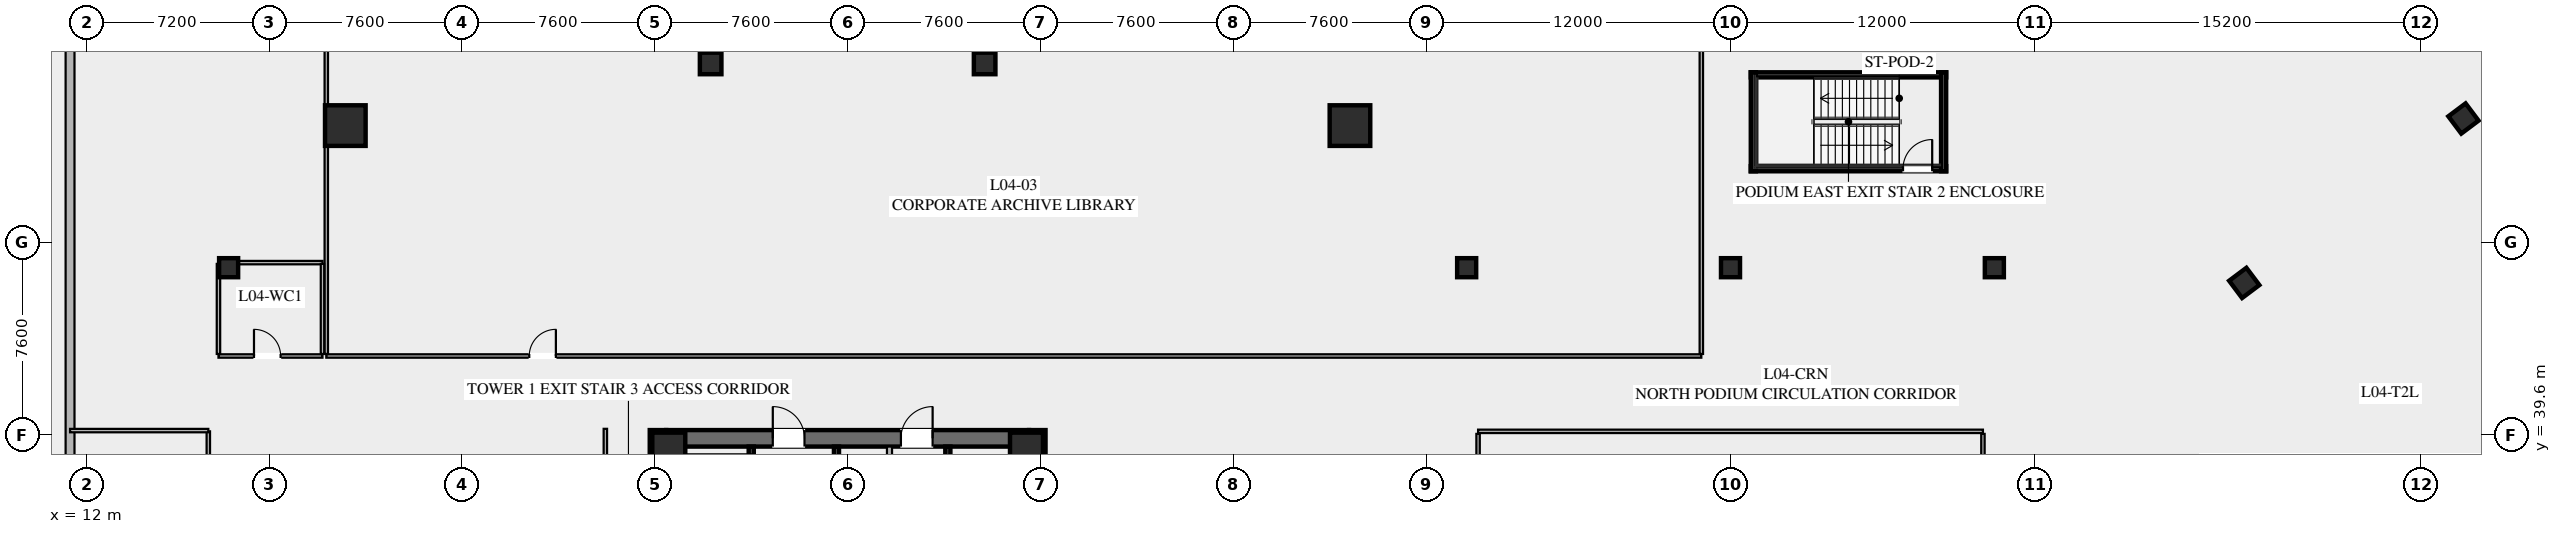
"""IFC4 building model, lengths in metres.
Left out: names, types, materials, properties, quantities, classifications, styles, units other than length and angle.
Written with IfcOpenShell. Run it as: python <this file> out.ifc"""

import sys

from ifc_helpers import new_model, si_unit, direction, frame, frame_2d, origin, origin_2d, place, context, subcontext, project, spatial, rectangle, hollow_rectangle, extrude, element, fill, save


model = new_model("IFC4")
c1 = context("Model", 3, precision=1e-05, world=origin(), true_north=direction((0.0, 1.0)))
c2 = subcontext(c1, "Body", "Model", "MODEL_VIEW")
j1 = project(units=[si_unit("LENGTHUNIT", "METRE"), si_unit("PLANEANGLEUNIT", "RADIAN")], contexts=[c1])
p1 = place(None, origin())
s1 = spatial("IfcSite", under=j1, at=p1, CompositionType="ELEMENT")
p2 = place(p1, origin())
s2 = spatial("IfcBuilding", under=s1, at=p2, CompositionType="ELEMENT")
p3 = place(p2, frame((0.0, 0.0, 19.8)))
s3 = spatial("IfcBuildingStorey", under=s2, at=p3, CompositionType="ELEMENT", Elevation=19.8)
for number, where, z_axis, x_axis in (
    (1, (34.525, 24.2, 0.0), (0.0, 0.0, 1.0), (0.0, 1.0, 0.0)),
    (2, (49.475, 39.8, 0.0), (0.0, 0.0, 1.0), (0.0, -1.0, 0.0)),
):
    element("IfcWall", number, at=place(p3, frame(where, z_axis=z_axis, x_axis=x_axis)), inside=s3, PredefinedType="SHEAR", context=c2, shape_type="SweptSolid", body=[
        extrude(rectangle(XDim=15.6, YDim=0.65, at=frame_2d((7.8, 0.0))), origin(), (0.0, 0.0, 1.0), 4.8),
    ])
p4 = place(p3, frame((34.85, 39.475, 0.0), z_axis=(0.0, 0.0, 1.0), x_axis=(1.0, 0.0, 0.0)))
e3 = element("IfcWall", 3, at=p4, inside=s3, PredefinedType="SHEAR", context=c2, shape_type="SweptSolid", body=[
    extrude(rectangle(XDim=14.3, YDim=0.65, at=frame_2d((7.15, 0.0))), origin(), (0.0, 0.0, 1.0), 4.8),
])
p5 = place(p4, frame((4.2, 0.0, 0.0)))
e4 = element("IfcOpeningElement", 4, at=p5, cuts=e3, PredefinedType="OPENING", context=c2, shape_type="SweptSolid", body=[
    extrude(rectangle(XDim=1.25, YDim=2.25, at=frame_2d((0.625, 1.125))), frame((0.0, 0.335, 0.0), z_axis=(0.0, -1.0, 0.0), x_axis=(1.0, 0.0, 0.0)), (0.0, 0.0, 1.0), 0.67),
])
p6 = place(p4, frame((9.25, 0.0, 0.0)))
e5 = element("IfcOpeningElement", 5, at=p6, cuts=e3, PredefinedType="OPENING", context=c2, shape_type="SweptSolid", body=[
    extrude(rectangle(XDim=1.25, YDim=2.25, at=frame_2d((0.625, 1.125))), frame((0.0, 0.335, 0.0), z_axis=(0.0, -1.0, 0.0), x_axis=(1.0, 0.0, 0.0)), (0.0, 0.0, 1.0), 0.67),
])
for number, where, z_axis, x_axis in (
    (6, (49.05, 39.05, 0.0), (0.0, 0.0, 1.0), (1.0, 0.0, 0.0)),
    (7, (34.95, 39.05, 0.0), (0.0, 0.0, 1.0), (1.0, 0.0, 0.0)),
):
    element("IfcColumn", number, at=place(p3, frame(where, z_axis=z_axis, x_axis=x_axis)), inside=s3, PredefinedType="COLUMN", context=c2, shape_type="SweptSolid", body=[
        extrude(hollow_rectangle(XDim=1.3, YDim=1.3, WallThickness=0.05, at=origin_2d()), origin(), (0.0, 0.0, 1.0), 4.6),
    ])
for number, where, z_axis, x_axis in (
    (8, (61.8, 51.8, 0.0), (0.0, 0.0, 1.0), (1.0, 0.0, 0.0)),
    (9, (22.2, 51.8, 0.0), (0.0, 0.0, 1.0), (1.0, 0.0, 0.0)),
):
    element("IfcColumn", number, at=place(p3, frame(where, z_axis=z_axis, x_axis=x_axis)), inside=s3, PredefinedType="COLUMN", context=c2, shape_type="SweptSolid", body=[
        extrude(hollow_rectangle(XDim=1.6, YDim=1.6, WallThickness=0.06, at=origin_2d()), origin(), (0.0, 0.0, 1.0), 4.6),
    ])
for number, where, z_axis, x_axis in (
    (10, (47.4, 54.25, 0.0), (0.0, 0.0, 1.0), (1.0, 0.0, 0.0)),
    (11, (36.6, 54.25, 0.0), (0.0, 0.0, 1.0), (1.0, 0.0, 0.0)),
):
    element("IfcColumn", number, at=place(p3, frame(where, z_axis=z_axis, x_axis=x_axis)), inside=s3, PredefinedType="COLUMN", context=c2, shape_type="SweptSolid", body=[
        extrude(hollow_rectangle(XDim=0.85, YDim=0.85, WallThickness=0.035, at=origin_2d()), origin(), (0.0, 0.0, 1.0), 4.6),
    ])
p7 = place(p3, frame((103.571, 33.522, 0.0), z_axis=(0.0, 0.0, 1.0), x_axis=(0.799998028465, 0.600002628705, 0.0)))
e12 = element("IfcWall", 12, at=p7, inside=s3, PredefinedType="SHEAR", context=c2, shape_type="SweptSolid", body=[
    extrude(rectangle(XDim=14.86, YDim=0.65, at=frame_2d((7.43, 0.0))), origin(), (0.0, 0.0, 1.0), 4.8),
])
p8 = place(p7, frame((4.48, 0.0, 0.0)))
e13 = element("IfcOpeningElement", 13, at=p8, cuts=e12, PredefinedType="OPENING", context=c2, shape_type="SweptSolid", body=[
    extrude(rectangle(XDim=1.25, YDim=2.25, at=frame_2d((0.625, 1.125))), frame((0.0, 0.335, 0.0), z_axis=(0.0, -1.0, 0.0), x_axis=(1.0, 0.0, 0.0)), (0.0, 0.0, 1.0), 0.67),
])
p9 = place(p7, frame((9.53, 0.0, 0.0)))
e14 = element("IfcOpeningElement", 14, at=p9, cuts=e12, PredefinedType="OPENING", context=c2, shape_type="SweptSolid", body=[
    extrude(rectangle(XDim=1.25, YDim=2.25, at=frame_2d((0.625, 1.125))), frame((0.0, 0.335, 0.0), z_axis=(0.0, -1.0, 0.0), x_axis=(1.0, 0.0, 0.0)), (0.0, 0.0, 1.0), 0.67),
])
for number, where, z_axis, x_axis in (
    (15, (105.69, 52.08, 0.0), (0.0, 0.0, 1.0), (0.8, 0.6, 0.0)),
    (16, (97.05, 45.6, 0.0), (0.0, 0.0, 1.0), (0.8, 0.6, 0.0)),
):
    element("IfcColumn", number, at=place(p3, frame(where, z_axis=z_axis, x_axis=x_axis)), inside=s3, PredefinedType="COLUMN", context=c2, shape_type="SweptSolid", body=[
        extrude(hollow_rectangle(XDim=0.85, YDim=0.85, WallThickness=0.035, at=origin_2d()), origin(), (0.0, 0.0, 1.0), 4.6),
    ])
for number, where, z_axis, x_axis in (
    (17, (17.6, 46.2, 0.0), (0.0, 0.0, 1.0), (1.0, 0.0, 0.0)),
    (18, (66.4, 46.2, 0.0), (0.0, 0.0, 1.0), (1.0, 0.0, 0.0)),
    (19, (76.8, 46.2, 0.0), (0.0, 0.0, 1.0), (1.0, 0.0, 0.0)),
    (20, (87.2, 46.2, 0.0), (0.0, 0.0, 1.0), (1.0, 0.0, 0.0)),
):
    element("IfcColumn", number, at=place(p3, frame(where, z_axis=z_axis, x_axis=x_axis)), inside=s3, PredefinedType="COLUMN", context=c2, shape_type="SweptSolid", body=[
        extrude(rectangle(XDim=0.75, YDim=0.75, at=origin_2d()), origin(), (0.0, 0.0, 1.0), 4.6),
    ])
p10 = place(p3, frame((11.35, 15.8, 0.0), z_axis=(0.0, 0.0, 1.0), x_axis=(0.0, 1.0, 0.0)))
e21 = element("IfcWall", 21, at=p10, inside=s3, PredefinedType="SOLIDWALL", context=c2, shape_type="SweptSolid", body=[
    extrude(rectangle(XDim=39.625, YDim=0.35, at=frame_2d((19.812, 0.0))), origin(), (0.0, 0.0, 1.0), 4.6),
])
p11 = place(p10, frame((15.7, 0.0, 0.0)))
e22 = element("IfcOpeningElement", 22, at=p11, cuts=e21, PredefinedType="OPENING", context=c2, shape_type="SweptSolid", body=[
    extrude(rectangle(XDim=1.65, YDim=2.2, at=frame_2d((0.825, 1.1))), frame((0.0, 0.185, 0.0), z_axis=(0.0, -1.0, 0.0), x_axis=(1.0, 0.0, 0.0)), (0.0, 0.0, 1.0), 0.37),
])
p12 = place(p3, frame((38.2, 31.2, 0.0), z_axis=(0.0, 0.0, 1.0), x_axis=(0.0, 1.0, 0.0)))
e23 = element("IfcWall", 23, at=p12, inside=s3, PredefinedType="SHEAR", context=c2, shape_type="SweptSolid", body=[
    extrude(rectangle(XDim=7.95, YDim=0.2, at=frame_2d((3.975, 0.0))), origin(), (0.0, 0.0, 1.0), 4.6),
])
p13 = place(p12, frame((0.45, 0.0, 0.0)))
e24 = element("IfcOpeningElement", 24, at=p13, cuts=e23, PredefinedType="OPENING", context=c2, shape_type="SweptSolid", body=[
    extrude(rectangle(XDim=1.15, YDim=2.2, at=frame_2d((0.575, 1.1))), frame((0.0, 0.11, 0.0), z_axis=(0.0, -1.0, 0.0), x_axis=(1.0, 0.0, 0.0)), (0.0, 0.0, 1.0), 0.22),
])
p14 = place(p3, frame((41.56, 24.85, 0.0), z_axis=(0.0, 0.0, 1.0), x_axis=(0.0, 1.0, 0.0)))
e25 = element("IfcWall", 25, at=p14, inside=s3, PredefinedType="SHEAR", context=c2, shape_type="SweptSolid", body=[
    extrude(rectangle(XDim=14.3, YDim=0.2, at=frame_2d((7.15, 0.0))), origin(), (0.0, 0.0, 1.0), 4.6),
])
p15 = place(p3, frame((45.95, 39.15, 0.0), z_axis=(0.0, 0.0, 1.0), x_axis=(0.0, -1.0, 0.0)))
e26 = element("IfcWall", 26, at=p15, inside=s3, PredefinedType="SHEAR", context=c2, shape_type="SweptSolid", body=[
    extrude(rectangle(XDim=6.35, YDim=0.2, at=frame_2d((3.175, 0.0))), origin(), (0.0, 0.0, 1.0), 4.6),
])
p16 = place(p3, frame((43.65, 32.35, 0.0), z_axis=(0.0, 0.0, 1.0), x_axis=(0.0, 1.0, 0.0)))
e27 = element("IfcWall", 27, at=p16, inside=s3, PredefinedType="SOLIDWALL", context=c2, shape_type="SweptSolid", body=[
    extrude(rectangle(XDim=6.8, YDim=0.2, at=frame_2d((3.4, 0.0))), origin(), (0.0, 0.0, 1.0), 4.6),
])
p17 = place(p3, frame((32.45, 35.4, 0.0), z_axis=(0.0, 0.0, 1.0), x_axis=(0.0, 1.0, 0.0)))
e28 = element("IfcWall", 28, at=p17, inside=s3, PredefinedType="PARTITIONING", context=c2, shape_type="SweptSolid", body=[
    extrude(rectangle(XDim=4.45, YDim=0.135, at=frame_2d((2.225, 0.0))), origin(), (0.0, 0.0, 1.0), 3.643),
])
p18 = place(p3, frame((77.6, 50.1, 0.0), z_axis=(0.0, 0.0, 1.0), x_axis=(1.0, 0.0, 0.0)))
e29 = element("IfcWall", 29, at=p18, inside=s3, PredefinedType="SHEAR", context=c2, shape_type="SweptSolid", body=[
    extrude(rectangle(XDim=7.7, YDim=0.2, at=frame_2d((3.85, 0.0))), origin(), (0.0, 0.0, 1.0), 4.6),
])
p19 = place(p18, frame((6.0, 0.0, 0.0)))
e30 = element("IfcOpeningElement", 30, at=p19, cuts=e29, PredefinedType="OPENING", context=c2, shape_type="SweptSolid", body=[
    extrude(rectangle(XDim=1.15, YDim=2.2, at=frame_2d((0.575, 1.1))), frame((0.0, 0.11, 0.0), z_axis=(0.0, -1.0, 0.0), x_axis=(1.0, 0.0, 0.0)), (0.0, 0.0, 1.0), 0.22),
])
p20 = place(p3, frame((77.6, 53.8, 0.0), z_axis=(0.0, 0.0, 1.0), x_axis=(1.0, 0.0, 0.0)))
e31 = element("IfcWall", 31, at=p20, inside=s3, PredefinedType="SHEAR", context=c2, shape_type="SweptSolid", body=[
    extrude(rectangle(XDim=7.7, YDim=0.2, at=frame_2d((3.85, 0.0))), origin(), (0.0, 0.0, 1.0), 4.6),
])
for number, where, z_axis, x_axis in (
    (32, (77.7, 50.0, 0.0), (0.0, 0.0, 1.0), (0.0, 1.0, 0.0)),
    (33, (85.2, 50.0, 0.0), (0.0, 0.0, 1.0), (0.0, 1.0, 0.0)),
):
    element("IfcWall", number, at=place(p3, frame(where, z_axis=z_axis, x_axis=x_axis)), inside=s3, PredefinedType="SHEAR", context=c2, shape_type="SweptSolid", body=[
        extrude(rectangle(XDim=3.9, YDim=0.2, at=frame_2d((1.95, 0.0))), origin(), (0.0, 0.0, 1.0), 4.6),
    ])
p21 = place(p3, frame((16.8, 24.35, 0.0), z_axis=(0.0, 0.0, 1.0), x_axis=(0.0, 1.0, 0.0)))
e34 = element("IfcWall", 34, at=p21, inside=s3, PredefinedType="PARTITIONING", context=c2, shape_type="SweptSolid", body=[
    extrude(rectangle(XDim=15.4, YDim=0.135, at=frame_2d((7.7, 0.0))), origin(), (0.0, 0.0, 1.0), 3.643),
])
p22 = place(p3, frame((11.35, 39.78, 0.0), z_axis=(0.0, 0.0, 1.0), x_axis=(1.0, 0.0, 0.0)))
e35 = element("IfcWall", 35, at=p22, inside=s3, PredefinedType="PARTITIONING", context=c2, shape_type="SweptSolid", body=[
    extrude(rectangle(XDim=5.45, YDim=0.135, at=frame_2d((2.725, 0.0))), origin(), (0.0, 0.0, 1.0), 3.643),
])
for number, where, z_axis, x_axis in (
    (36, (66.85, 24.35, 0.0), (0.0, 0.0, 1.0), (0.0, 1.0, 0.0)),
    (37, (86.75, 24.35, 0.0), (0.0, 0.0, 1.0), (0.0, 1.0, 0.0)),
):
    element("IfcWall", number, at=place(p3, frame(where, z_axis=z_axis, x_axis=x_axis)), inside=s3, PredefinedType="PARTITIONING", context=c2, shape_type="SweptSolid", body=[
        extrude(rectangle(XDim=15.3, YDim=0.135, at=frame_2d((7.65, 0.0))), origin(), (0.0, 0.0, 1.0), 3.643),
    ])
p23 = place(p3, frame((66.85, 39.75, 0.0), z_axis=(0.0, 0.0, 1.0), x_axis=(1.0, 0.0, 0.0)))
e38 = element("IfcWall", 38, at=p23, inside=s3, PredefinedType="PARTITIONING", context=c2, shape_type="SweptSolid", body=[
    extrude(rectangle(XDim=19.9, YDim=0.135, at=frame_2d((9.95, 0.0))), origin(), (0.0, 0.0, 1.0), 3.643),
])
p24 = place(p3, frame((21.45, 42.72, 0.0), z_axis=(0.0, 0.0, 1.0), x_axis=(1.0, 0.0, 0.0)))
e39 = element("IfcWall", 39, at=p24, inside=s3, PredefinedType="PARTITIONING", context=c2, shape_type="SweptSolid", body=[
    extrude(rectangle(XDim=54.2, YDim=0.135, at=frame_2d((27.1, 0.0))), origin(), (0.0, 0.0, 1.0), 3.643),
])
p25 = place(p24, frame((8.0, 0.0, 0.0)))
e40 = element("IfcOpeningElement", 40, at=p25, cuts=e39, PredefinedType="OPENING", context=c2, shape_type="SweptSolid", body=[
    extrude(rectangle(XDim=1.05, YDim=2.2, at=frame_2d((0.525, 1.1))), frame((0.0, 0.077, 0.0), z_axis=(0.0, -1.0, 0.0), x_axis=(1.0, 0.0, 0.0)), (0.0, 0.0, 1.0), 0.155),
])
for number, where, z_axis, x_axis in (
    (41, (21.45, 42.8, 0.0), (0.0, 0.0, 1.0), (0.0, 1.0, 0.0)),
    (42, (75.65, 42.8, 0.0), (0.0, 0.0, 1.0), (0.0, 1.0, 0.0)),
):
    element("IfcWall", number, at=place(p3, frame(where, z_axis=z_axis, x_axis=x_axis)), inside=s3, PredefinedType="PARTITIONING", context=c2, shape_type="SweptSolid", body=[
        extrude(rectangle(XDim=12.62, YDim=0.135, at=frame_2d((6.31, 0.0))), origin(), (0.0, 0.0, 1.0), 3.643),
    ])
p26 = place(p3, frame((17.2, 42.72, 0.0), z_axis=(0.0, 0.0, 1.0), x_axis=(1.0, 0.0, 0.0)))
e43 = element("IfcWall", 43, at=p26, inside=s3, PredefinedType="PARTITIONING", context=c2, shape_type="SweptSolid", body=[
    extrude(rectangle(XDim=4.1, YDim=0.135, at=frame_2d((2.05, 0.0))), origin(), (0.0, 0.0, 1.0), 3.643),
])
p27 = place(p26, frame((1.4, 0.0, 0.0)))
e44 = element("IfcOpeningElement", 44, at=p27, cuts=e43, PredefinedType="OPENING", context=c2, shape_type="SweptSolid", body=[
    extrude(rectangle(XDim=1.05, YDim=2.2, at=frame_2d((0.525, 1.1))), frame((0.0, 0.077, 0.0), z_axis=(0.0, -1.0, 0.0), x_axis=(1.0, 0.0, 0.0)), (0.0, 0.0, 1.0), 0.155),
])
p28 = place(p3, frame((17.2, 46.4, 0.0), z_axis=(0.0, 0.0, 1.0), x_axis=(1.0, 0.0, 0.0)))
e45 = element("IfcWall", 45, at=p28, inside=s3, PredefinedType="PARTITIONING", context=c2, shape_type="SweptSolid", body=[
    extrude(rectangle(XDim=4.1, YDim=0.135, at=frame_2d((2.05, 0.0))), origin(), (0.0, 0.0, 1.0), 3.643),
])
for number, where, z_axis, x_axis in (
    (46, (17.2, 42.8, 0.0), (0.0, 0.0, 1.0), (0.0, 1.0, 0.0)),
    (47, (21.3, 42.8, 0.0), (0.0, 0.0, 1.0), (0.0, 1.0, 0.0)),
):
    element("IfcWall", number, at=place(p3, frame(where, z_axis=z_axis, x_axis=x_axis)), inside=s3, PredefinedType="PARTITIONING", context=c2, shape_type="SweptSolid", body=[
        extrude(rectangle(XDim=3.55, YDim=0.135, at=frame_2d((1.775, 0.0))), origin(), (0.0, 0.0, 1.0), 3.643),
    ])
p29 = place(p5, origin())
e48 = element("IfcDoor", 48, at=p29, inside=s3, OperationType="SINGLE_SWING_LEFT", PredefinedType="DOOR", context=c2, shape_type="SweptSolid", body=[
    extrude(rectangle(XDim=1.25, YDim=2.25, at=frame_2d((0.625, 1.125))), frame((0.0, 0.025, 0.0), z_axis=(0.0, -1.0, 0.0), x_axis=(1.0, 0.0, 0.0)), (0.0, 0.0, 1.0), 0.05),
])
fill(e4, e48)
p30 = place(p6, origin())
e49 = element("IfcDoor", 49, at=p30, inside=s3, OperationType="SINGLE_SWING_RIGHT", PredefinedType="DOOR", context=c2, shape_type="SweptSolid", body=[
    extrude(rectangle(XDim=1.25, YDim=2.25, at=frame_2d((0.625, 1.125))), frame((0.0, 0.025, 0.0), z_axis=(0.0, -1.0, 0.0), x_axis=(1.0, 0.0, 0.0)), (0.0, 0.0, 1.0), 0.05),
])
fill(e5, e49)
p31 = place(p19, origin())
e50 = element("IfcDoor", 50, at=p31, inside=s3, OperationType="SINGLE_SWING_RIGHT", PredefinedType="DOOR", context=c2, shape_type="SweptSolid", body=[
    extrude(rectangle(XDim=1.15, YDim=2.2, at=frame_2d((0.575, 1.1))), frame((0.0, 0.025, 0.0), z_axis=(0.0, -1.0, 0.0), x_axis=(1.0, 0.0, 0.0)), (0.0, 0.0, 1.0), 0.05),
])
fill(e30, e50)
p32 = place(p25, origin())
e51 = element("IfcDoor", 51, at=p32, inside=s3, OperationType="SINGLE_SWING_RIGHT", PredefinedType="DOOR", context=c2, shape_type="SweptSolid", body=[
    extrude(rectangle(XDim=1.05, YDim=2.2, at=frame_2d((0.525, 1.1))), frame((0.0, 0.025, 0.0), z_axis=(0.0, -1.0, 0.0), x_axis=(1.0, 0.0, 0.0)), (0.0, 0.0, 1.0), 0.05),
])
fill(e40, e51)
p33 = place(p27, origin())
e52 = element("IfcDoor", 52, at=p33, inside=s3, OperationType="SINGLE_SWING_LEFT", PredefinedType="DOOR", context=c2, shape_type="SweptSolid", body=[
    extrude(rectangle(XDim=1.05, YDim=2.2, at=frame_2d((0.525, 1.1))), frame((0.0, 0.025, 0.0), z_axis=(0.0, -1.0, 0.0), x_axis=(1.0, 0.0, 0.0)), (0.0, 0.0, 1.0), 0.05),
])
fill(e44, e52)
save(model, sys.argv[1])
